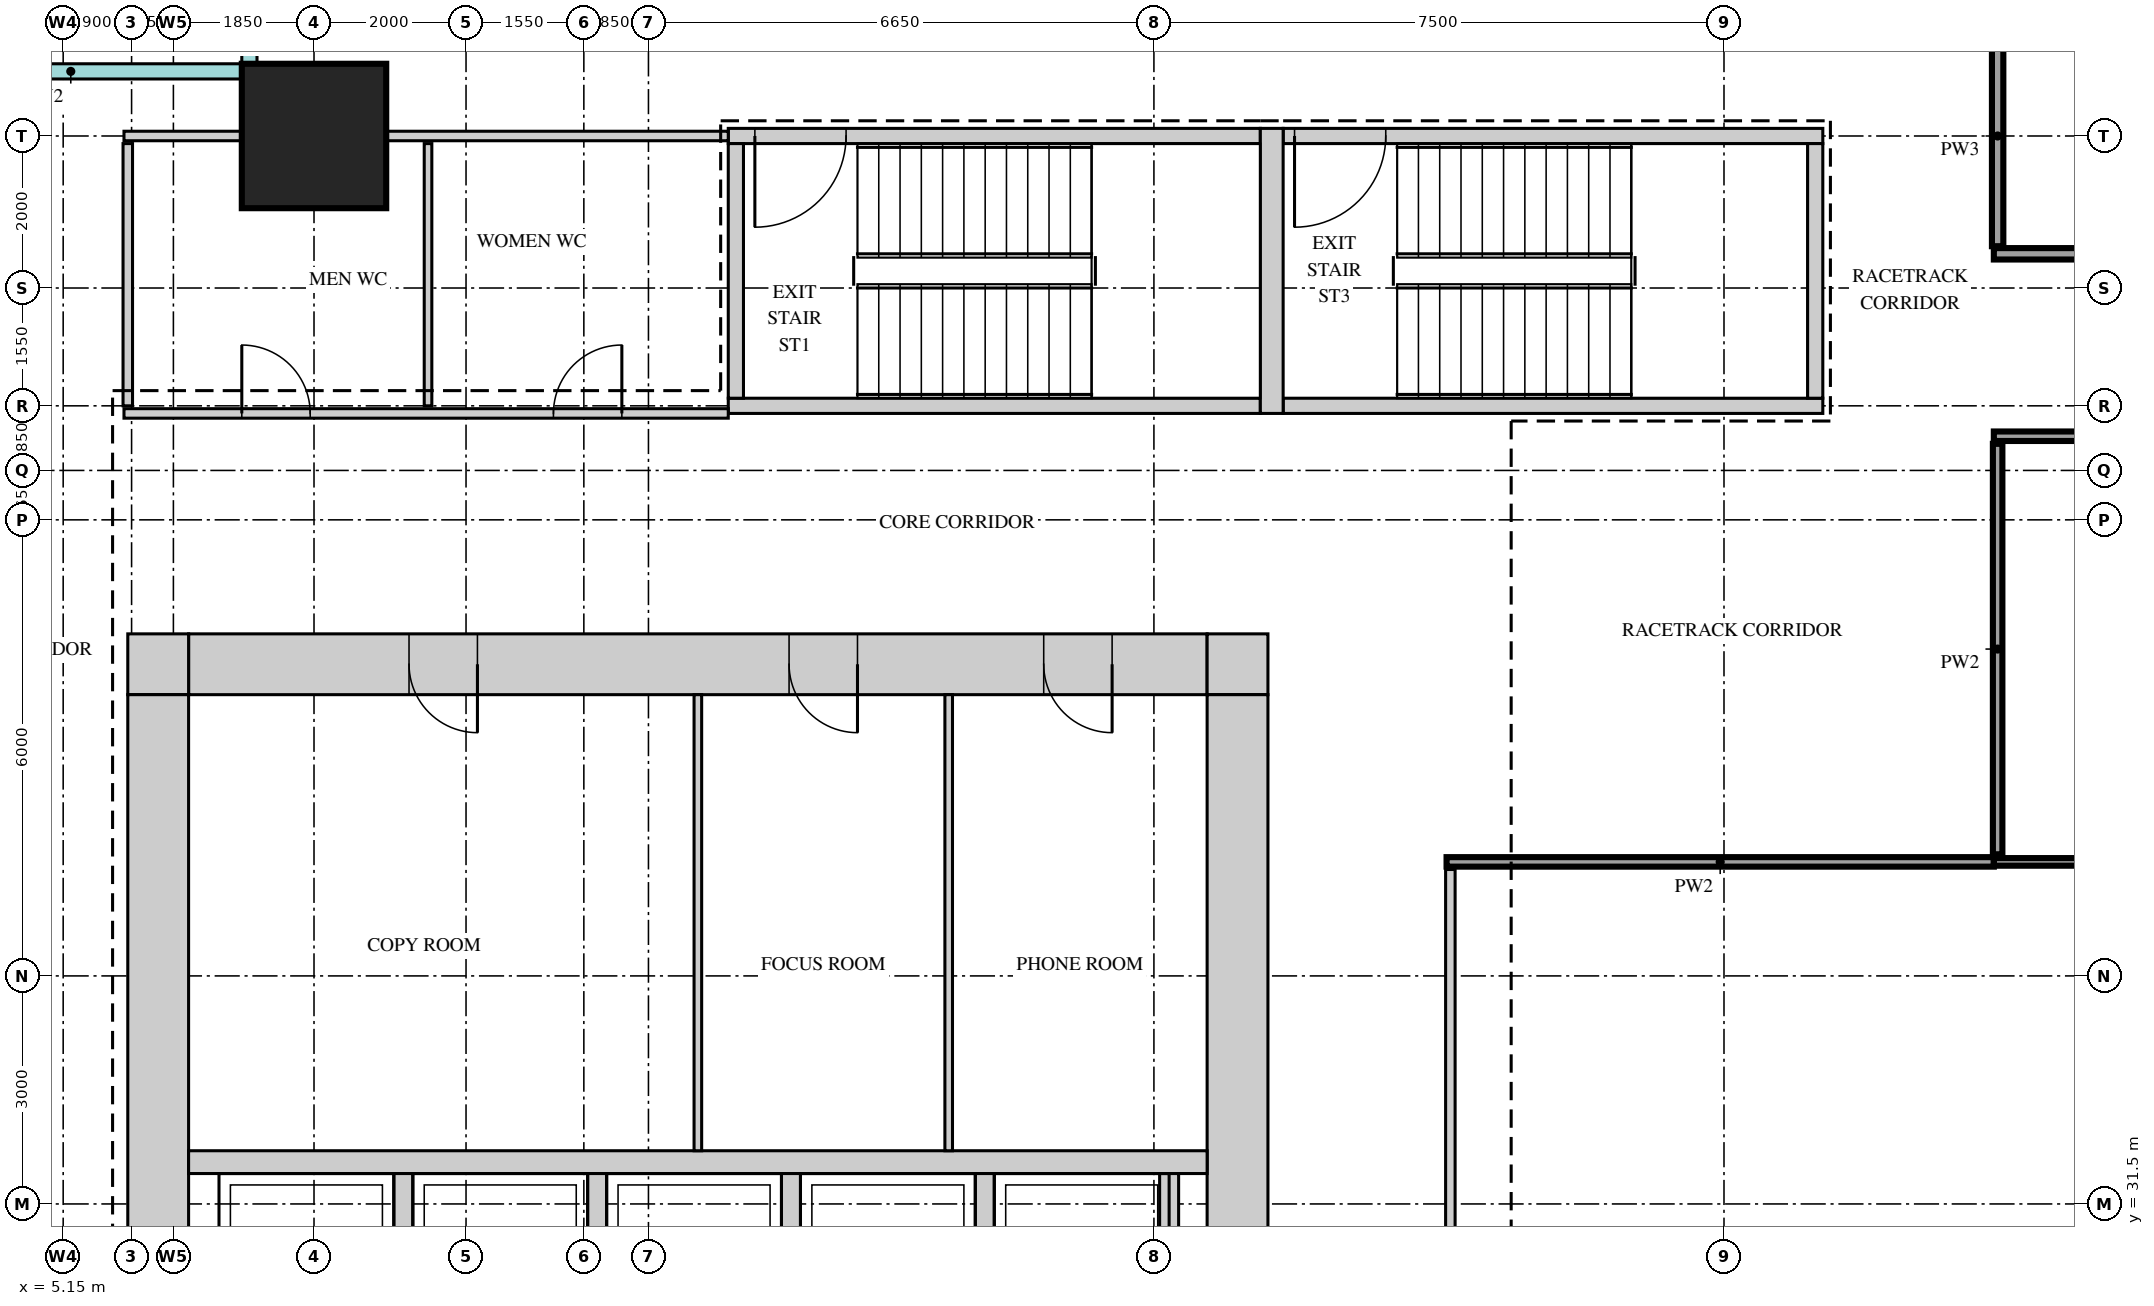
"""IFC4 building model, lengths in metres.
Left out: names, types, materials, properties, quantities, classifications, styles, units other than length and angle.
Written with IfcOpenShell. Run it as: python <this file> out.ifc"""

import sys

from ifc_helpers import new_model, si_unit, direction, frame, frame_2d, origin, origin_2d, place, context, subcontext, project, spatial, rectangle, extrude, source, transform, mapped, element, fill, save


model = new_model("IFC4")
c1 = context("Model", 3, precision=1e-05, world=origin(), true_north=direction((0.0, 1.0)))
c2 = subcontext(c1, "Body", "Model", "MODEL_VIEW")
j1 = project(units=[si_unit("LENGTHUNIT", "METRE"), si_unit("PLANEANGLEUNIT", "RADIAN")], contexts=[c1])
p1 = place(None, origin())
s1 = spatial("IfcSite", under=j1, at=p1, CompositionType="ELEMENT")
p2 = place(p1, origin())
s2 = spatial("IfcBuilding", under=s1, at=p2, CompositionType="ELEMENT")
p3 = place(p2, frame((0.0, 0.0, 212.7)))
s3 = spatial("IfcBuildingStorey", under=s2, at=p3, CompositionType="ELEMENT", Elevation=212.7)
m1 = source(origin(), c2, "Body", "SweptSolid", [
    extrude(rectangle(XDim=13.4, YDim=0.8, at=frame_2d((6.7, 0.0))), origin(), (0.0, 0.0, 1.0), 3.75),
])
p4 = place(p3, frame((6.8, 38.6, 0.0), z_axis=(0.0, 0.0, 1.0), x_axis=(1.0, 0.0, 0.0)))
e1 = element("IfcWall", 1, at=p4, inside=s3, PredefinedType="SHEAR", context=c2, shape_type="MappedRepresentation", body=[
    mapped(m1, transform((0.0, 0.0, 0.0))),
])
m2 = source(origin(), c2, "Body", "SweptSolid", [
    extrude(rectangle(XDim=0.9, YDim=2.1, at=frame_2d((0.45, 1.05))), frame((0.0, 0.41, 0.0), z_axis=(0.0, -1.0, 0.0), x_axis=(1.0, 0.0, 0.0)), (0.0, 0.0, 1.0), 0.82),
])
p5 = place(p4, frame((2.9, 0.0, 0.0)))
e2 = element("IfcOpeningElement", 2, at=p5, cuts=e1, PredefinedType="OPENING", context=c2, shape_type="MappedRepresentation", body=[
    mapped(m2, transform((0.0, 0.0, 0.0))),
])
p6 = place(p4, frame((7.9, 0.0, 0.0)))
e3 = element("IfcOpeningElement", 3, at=p6, cuts=e1, PredefinedType="OPENING", context=c2, shape_type="MappedRepresentation", body=[
    mapped(m2, transform((0.0, 0.0, 0.0))),
])
p7 = place(p4, frame((11.25, 0.0, 0.0)))
e4 = element("IfcOpeningElement", 4, at=p7, cuts=e1, PredefinedType="OPENING", context=c2, shape_type="MappedRepresentation", body=[
    mapped(m2, transform((0.0, 0.0, 0.0))),
])
m3 = source(origin(), c2, "Body", "SweptSolid", [
    extrude(rectangle(XDim=0.8, YDim=0.8, at=frame_2d((0.4, 0.0))), origin(), (0.0, 0.0, 1.0), 3.75),
])
for number, where, z_axis, x_axis in (
    (5, (20.2, 38.6, 0.0), (0.0, 0.0, 1.0), (1.0, 0.0, 0.0)),
    (6, (6.0, 38.6, 0.0), (0.0, 0.0, 1.0), (1.0, 0.0, 0.0)),
):
    element("IfcWall", number, at=place(p3, frame(where, z_axis=z_axis, x_axis=x_axis)), inside=s3, PredefinedType="SHEAR", context=c2, shape_type="MappedRepresentation", body=[
        mapped(m3, transform((0.0, 0.0, 0.0))),
    ])
m4 = source(origin(), c2, "Body", "SweptSolid", [
    extrude(rectangle(XDim=22.4, YDim=0.8, at=frame_2d((11.2, 0.0))), origin(), (0.0, 0.0, 1.0), 3.75),
])
p8 = place(p3, frame((20.6, 15.8, 0.0), z_axis=(0.0, 0.0, 1.0), x_axis=(0.0, 1.0, 0.0)))
e7 = element("IfcWall", 7, at=p8, inside=s3, PredefinedType="SHEAR", context=c2, shape_type="MappedRepresentation", body=[
    mapped(m4, transform((0.0, 0.0, 0.0))),
])
m5 = source(origin(), c2, "Body", "SweptSolid", [
    extrude(rectangle(XDim=1.8, YDim=2.1, at=frame_2d((0.9, 1.05))), frame((0.0, 0.41, 0.0), z_axis=(0.0, -1.0, 0.0), x_axis=(1.0, 0.0, 0.0)), (0.0, 0.0, 1.0), 0.82),
])
p9 = place(p8, frame((10.7, 0.0, 0.0)))
e8 = element("IfcOpeningElement", 8, at=p9, cuts=e7, PredefinedType="OPENING", context=c2, shape_type="MappedRepresentation", body=[
    mapped(m5, transform((0.0, 0.0, 0.0))),
])
p10 = place(p8, frame((0.35, 0.0, 0.0)))
e9 = element("IfcOpeningElement", 9, at=p10, cuts=e7, PredefinedType="OPENING", context=c2, shape_type="MappedRepresentation", body=[
    mapped(m2, transform((0.0, 0.0, 0.0))),
])
p11 = place(p8, frame((3.9, 0.0, 0.0)))
e10 = element("IfcOpeningElement", 10, at=p11, cuts=e7, PredefinedType="OPENING", context=c2, shape_type="MappedRepresentation", body=[
    mapped(m2, transform((0.0, 0.0, 0.0))),
])
p12 = place(p3, frame((6.4, 15.8, 0.0), z_axis=(0.0, 0.0, 1.0), x_axis=(0.0, 1.0, 0.0)))
e11 = element("IfcWall", 11, at=p12, inside=s3, PredefinedType="SHEAR", context=c2, shape_type="MappedRepresentation", body=[
    mapped(m4, transform((0.0, 0.0, 0.0))),
])
m6 = source(origin(), c2, "Body", "SweptSolid", [
    extrude(rectangle(XDim=7.0, YDim=0.2, at=frame_2d((3.5, 0.0))), origin(), (0.0, 0.0, 1.0), 3.75),
])
p13 = place(p3, frame((13.9, 45.55, 0.0), z_axis=(0.0, 0.0, 1.0), x_axis=(1.0, 0.0, 0.0)))
e12 = element("IfcWall", 12, at=p13, inside=s3, PredefinedType="SHEAR", context=c2, shape_type="MappedRepresentation", body=[
    mapped(m6, transform((0.0, 0.0, 0.0))),
])
m7 = source(origin(), c2, "Body", "SweptSolid", [
    extrude(rectangle(XDim=1.2, YDim=2.1, at=frame_2d((0.6, 1.05))), frame((0.0, 0.11, 0.0), z_axis=(0.0, -1.0, 0.0), x_axis=(1.0, 0.0, 0.0)), (0.0, 0.0, 1.0), 0.22),
])
p14 = place(p13, frame((0.35, 0.0, 0.0)))
e13 = element("IfcOpeningElement", 13, at=p14, cuts=e12, PredefinedType="OPENING", context=c2, shape_type="MappedRepresentation", body=[
    mapped(m7, transform((0.0, 0.0, 0.0))),
])
p15 = place(p3, frame((13.9, 42.0, 0.0), z_axis=(0.0, 0.0, 1.0), x_axis=(1.0, 0.0, 0.0)))
e14 = element("IfcWall", 14, at=p15, inside=s3, PredefinedType="SHEAR", context=c2, shape_type="MappedRepresentation", body=[
    mapped(m6, transform((0.0, 0.0, 0.0))),
])
m8 = source(origin(), c2, "Body", "SweptSolid", [
    extrude(rectangle(XDim=7.1, YDim=0.2, at=frame_2d((3.55, 0.0))), origin(), (0.0, 0.0, 1.0), 3.75),
])
p16 = place(p3, frame((21.2, 45.55, 0.0), z_axis=(0.0, 0.0, 1.0), x_axis=(1.0, 0.0, 0.0)))
e15 = element("IfcWall", 15, at=p16, inside=s3, PredefinedType="SHEAR", context=c2, shape_type="MappedRepresentation", body=[
    mapped(m8, transform((0.0, 0.0, 0.0))),
])
p17 = place(p16, frame((0.15, 0.0, 0.0)))
e16 = element("IfcOpeningElement", 16, at=p17, cuts=e15, PredefinedType="OPENING", context=c2, shape_type="MappedRepresentation", body=[
    mapped(m7, transform((0.0, 0.0, 0.0))),
])
p18 = place(p3, frame((21.2, 42.0, 0.0), z_axis=(0.0, 0.0, 1.0), x_axis=(1.0, 0.0, 0.0)))
e17 = element("IfcWall", 17, at=p18, inside=s3, PredefinedType="SHEAR", context=c2, shape_type="MappedRepresentation", body=[
    mapped(m8, transform((0.0, 0.0, 0.0))),
])
m9 = source(origin(), c2, "Body", "SweptSolid", [
    extrude(rectangle(XDim=3.75, YDim=0.3, at=frame_2d((1.875, 0.0))), origin(), (0.0, 0.0, 1.0), 3.75),
])
p19 = place(p3, frame((21.05, 41.9, 0.0), z_axis=(0.0, 0.0, 1.0), x_axis=(0.0, 1.0, 0.0)))
e18 = element("IfcWall", 18, at=p19, inside=s3, PredefinedType="SHEAR", context=c2, shape_type="MappedRepresentation", body=[
    mapped(m9, transform((0.0, 0.0, 0.0))),
])
m10 = source(origin(), c2, "Body", "SweptSolid", [
    extrude(rectangle(XDim=3.35, YDim=0.2, at=frame_2d((1.675, 0.0))), origin(), (0.0, 0.0, 1.0), 3.75),
])
for number, where, z_axis, x_axis in (
    (19, (14.0, 42.1, 0.0), (0.0, 0.0, 1.0), (0.0, 1.0, 0.0)),
    (20, (28.2, 42.1, 0.0), (0.0, 0.0, 1.0), (0.0, 1.0, 0.0)),
):
    element("IfcWall", number, at=place(p3, frame(where, z_axis=z_axis, x_axis=x_axis)), inside=s3, PredefinedType="SHEAR", context=c2, shape_type="MappedRepresentation", body=[
        mapped(m10, transform((0.0, 0.0, 0.0))),
    ])
m11 = source(origin(), c2, "Body", "SweptSolid", [
    extrude(rectangle(XDim=13.4, YDim=0.3, at=frame_2d((6.7, 0.0))), origin(), (0.0, 0.0, 1.0), 3.75),
])
p20 = place(p3, frame((6.8, 32.05, 0.0), z_axis=(0.0, 0.0, 1.0), x_axis=(1.0, 0.0, 0.0)))
e21 = element("IfcWall", 21, at=p20, inside=s3, PredefinedType="STANDARD", context=c2, shape_type="MappedRepresentation", body=[
    mapped(m11, transform((0.0, 0.0, 0.0))),
])
m12 = source(origin(), c2, "Body", "SweptSolid", [
    extrude(rectangle(XDim=2.4, YDim=0.25, at=frame_2d((1.2, 0.0))), origin(), (0.0, 0.0, 1.0), 3.75),
])
for number, where, z_axis, x_axis in (
    (22, (17.275, 29.5, 0.0), (0.0, 0.0, 1.0), (0.0, 1.0, 0.0)),
    (23, (19.7, 29.5, 0.0), (0.0, 0.0, 1.0), (0.0, 1.0, 0.0)),
    (24, (9.625, 29.5, 0.0), (0.0, 0.0, 1.0), (0.0, 1.0, 0.0)),
    (25, (12.175, 29.5, 0.0), (0.0, 0.0, 1.0), (0.0, 1.0, 0.0)),
    (26, (14.725, 29.5, 0.0), (0.0, 0.0, 1.0), (0.0, 1.0, 0.0)),
):
    element("IfcWall", number, at=place(p3, frame(where, z_axis=z_axis, x_axis=x_axis)), inside=s3, PredefinedType="STANDARD", context=c2, shape_type="MappedRepresentation", body=[
        mapped(m12, transform((0.0, 0.0, 0.0))),
    ])
m13 = source(origin(), c2, "Body", "SweptSolid", [
    extrude(rectangle(XDim=1.9, YDim=1.9, at=origin_2d()), origin(), (0.0, 0.0, 1.0), 4.0),
])
p21 = place(p3, frame((8.45, 45.55, 0.0), z_axis=(0.0, 0.0, 1.0), x_axis=(1.0, 0.0, 0.0)))
e27 = element("IfcColumn", 27, at=p21, inside=s3, PredefinedType="COLUMN", context=c2, shape_type="MappedRepresentation", body=[
    mapped(m13, transform((0.0, 0.0, 0.0))),
])
m14 = source(origin(), c2, "Body", "SweptSolid", [
    extrude(rectangle(XDim=23.4, YDim=0.125, at=frame_2d((11.7, 0.0))), origin(), (0.0, 0.0, 1.0), 3.8),
])
p22 = place(p3, frame((23.4, 12.5, 0.0), z_axis=(0.0, 0.0, 1.0), x_axis=(0.0, 1.0, 0.0)))
e28 = element("IfcWall", 28, at=p22, inside=s3, PredefinedType="PARTITIONING", context=c2, shape_type="MappedRepresentation", body=[
    mapped(m14, transform((0.0, 0.0, 0.0))),
])
m15 = source(origin(), c2, "Body", "SweptSolid", [
    extrude(rectangle(XDim=1.2, YDim=2.1, at=frame_2d((0.6, 1.05))), frame((0.0, 0.073, 0.0), z_axis=(0.0, -1.0, 0.0), x_axis=(1.0, 0.0, 0.0)), (0.0, 0.0, 1.0), 0.145),
])
p23 = place(p22, frame((11.1, 0.0, 0.0)))
e29 = element("IfcOpeningElement", 29, at=p23, cuts=e28, PredefinedType="OPENING", context=c2, shape_type="MappedRepresentation", body=[
    mapped(m15, transform((0.0, 0.0, 0.0))),
])
m16 = source(origin(), c2, "Body", "SweptSolid", [
    extrude(rectangle(XDim=6.0, YDim=0.1, at=frame_2d((3.0, 0.0))), origin(), (0.0, 0.0, 1.0), 3.8),
])
for number, where, z_axis, x_axis in (
    (30, (13.5, 32.2, 0.0), (0.0, 0.0, 1.0), (0.0, 1.0, 0.0)),
    (31, (16.8, 32.2, 0.0), (0.0, 0.0, 1.0), (0.0, 1.0, 0.0)),
):
    element("IfcWall", number, at=place(p3, frame(where, z_axis=z_axis, x_axis=x_axis)), inside=s3, PredefinedType="PARTITIONING", context=c2, shape_type="MappedRepresentation", body=[
        mapped(m16, transform((0.0, 0.0, 0.0))),
    ])
m17 = source(origin(), c2, "Body", "SweptSolid", [
    extrude(rectangle(XDim=7.2, YDim=0.125, at=frame_2d((3.6, 0.0))), origin(), (0.0, 0.0, 1.0), 3.8),
])
p24 = place(p3, frame((23.35, 36.0, 0.0), z_axis=(0.0, 0.0, 1.0), x_axis=(1.0, 0.0, 0.0)))
e32 = element("IfcWall", 32, at=p24, inside=s3, PredefinedType="PARTITIONING", context=c2, shape_type="MappedRepresentation", body=[
    mapped(m17, transform((0.0, 0.0, 0.0))),
])
m18 = source(origin(), c2, "Body", "SweptSolid", [
    extrude(rectangle(XDim=10.95, YDim=0.1, at=frame_2d((5.475, 0.0))), origin(), (0.0, 0.0, 1.0), 3.8),
])
p25 = place(p3, frame((30.55, 36.0, 0.0), z_axis=(0.0, 0.0, 1.0), x_axis=(1.0, 0.0, 0.0)))
e33 = element("IfcWall", 33, at=p25, inside=s3, PredefinedType="PARTITIONING", context=c2, shape_type="MappedRepresentation", body=[
    mapped(m18, transform((0.0, 0.0, 0.0))),
])
m19 = source(origin(), c2, "Body", "SweptSolid", [
    extrude(rectangle(XDim=5.4, YDim=0.125, at=frame_2d((2.7, 0.0))), origin(), (0.0, 0.0, 1.0), 3.8),
])
p26 = place(p3, frame((30.6, 36.1, 0.0), z_axis=(0.0, 0.0, 1.0), x_axis=(0.0, 1.0, 0.0)))
e34 = element("IfcWall", 34, at=p26, inside=s3, PredefinedType="PARTITIONING", context=c2, shape_type="MappedRepresentation", body=[
    mapped(m19, transform((0.0, 0.0, 0.0))),
])
m20 = source(origin(), c2, "Body", "SweptSolid", [
    extrude(rectangle(XDim=11.1, YDim=0.125, at=frame_2d((5.55, 0.0))), origin(), (0.0, 0.0, 1.0), 3.8),
])
p27 = place(p3, frame((30.55, 41.6, 0.0), z_axis=(0.0, 0.0, 1.0), x_axis=(1.0, 0.0, 0.0)))
e35 = element("IfcWall", 35, at=p27, inside=s3, PredefinedType="PARTITIONING", context=c2, shape_type="MappedRepresentation", body=[
    mapped(m20, transform((0.0, 0.0, 0.0))),
])
m21 = source(origin(), c2, "Body", "SweptSolid", [
    extrude(rectangle(XDim=7.95, YDim=0.125, at=frame_2d((3.975, 0.0))), origin(), (0.0, 0.0, 1.0), 3.8),
])
p28 = place(p3, frame((5.95, 41.9, 0.0), z_axis=(0.0, 0.0, 1.0), x_axis=(1.0, 0.0, 0.0)))
e36 = element("IfcWall", 36, at=p28, inside=s3, PredefinedType="PARTITIONING", context=c2, shape_type="MappedRepresentation", body=[
    mapped(m21, transform((0.0, 0.0, 0.0))),
])
m22 = source(origin(), c2, "Body", "SweptSolid", [
    extrude(rectangle(XDim=0.9, YDim=2.1, at=frame_2d((0.45, 1.05))), frame((0.0, 0.073, 0.0), z_axis=(0.0, -1.0, 0.0), x_axis=(1.0, 0.0, 0.0)), (0.0, 0.0, 1.0), 0.145),
])
p29 = place(p28, frame((1.55, 0.0, 0.0)))
e37 = element("IfcOpeningElement", 37, at=p29, cuts=e36, PredefinedType="OPENING", context=c2, shape_type="MappedRepresentation", body=[
    mapped(m22, transform((0.0, 0.0, 0.0))),
])
p30 = place(p28, frame((5.65, 0.0, 0.0)))
e38 = element("IfcOpeningElement", 38, at=p30, cuts=e36, PredefinedType="OPENING", context=c2, shape_type="MappedRepresentation", body=[
    mapped(m22, transform((0.0, 0.0, 0.0))),
])
m23 = source(origin(), c2, "Body", "SweptSolid", [
    extrude(rectangle(XDim=3.45, YDim=0.125, at=frame_2d((1.725, 0.0))), origin(), (0.0, 0.0, 1.0), 3.8),
])
p31 = place(p3, frame((6.0, 42.0, 0.0), z_axis=(0.0, 0.0, 1.0), x_axis=(0.0, 1.0, 0.0)))
e39 = element("IfcWall", 39, at=p31, inside=s3, PredefinedType="PARTITIONING", context=c2, shape_type="MappedRepresentation", body=[
    mapped(m23, transform((0.0, 0.0, 0.0))),
])
m24 = source(origin(), c2, "Body", "SweptSolid", [
    extrude(rectangle(XDim=3.45, YDim=0.1, at=frame_2d((1.725, 0.0))), origin(), (0.0, 0.0, 1.0), 3.8),
])
p32 = place(p3, frame((9.95, 42.0, 0.0), z_axis=(0.0, 0.0, 1.0), x_axis=(0.0, 1.0, 0.0)))
e40 = element("IfcWall", 40, at=p32, inside=s3, PredefinedType="PARTITIONING", context=c2, shape_type="MappedRepresentation", body=[
    mapped(m24, transform((0.0, 0.0, 0.0))),
])
m25 = source(origin(), c2, "Body", "SweptSolid", [
    extrude(rectangle(XDim=11.4, YDim=0.15, at=frame_2d((5.7, 0.0))), origin(), (0.0, 0.0, 1.0), 3.8),
])
p33 = place(p3, frame((30.55, 44.0, 0.0), z_axis=(0.0, 0.0, 1.0), x_axis=(1.0, 0.0, 0.0)))
e41 = element("IfcWall", 41, at=p33, inside=s3, PredefinedType="PARTITIONING", context=c2, shape_type="MappedRepresentation", body=[
    mapped(m25, transform((0.0, 0.0, 0.0))),
])
m26 = source(origin(), c2, "Body", "SweptSolid", [
    extrude(rectangle(XDim=0.9, YDim=2.1, at=frame_2d((0.45, 1.05))), frame((0.0, 0.085, 0.0), z_axis=(0.0, -1.0, 0.0), x_axis=(1.0, 0.0, 0.0)), (0.0, 0.0, 1.0), 0.17),
])
p34 = place(p33, frame((5.3, 0.0, 0.0)))
e42 = element("IfcOpeningElement", 42, at=p34, cuts=e41, PredefinedType="OPENING", context=c2, shape_type="MappedRepresentation", body=[
    mapped(m26, transform((0.0, 0.0, 0.0))),
])
m27 = source(origin(), c2, "Body", "SweptSolid", [
    extrude(rectangle(XDim=2.9, YDim=0.15, at=frame_2d((1.45, 0.0))), origin(), (0.0, 0.0, 1.0), 3.8),
])
p35 = place(p3, frame((30.6, 44.1, 0.0), z_axis=(0.0, 0.0, 1.0), x_axis=(0.0, 1.0, 0.0)))
e43 = element("IfcWall", 43, at=p35, inside=s3, PredefinedType="PARTITIONING", context=c2, shape_type="MappedRepresentation", body=[
    mapped(m27, transform((0.0, 0.0, 0.0))),
])
m28 = source(origin(), c2, "Body", "SweptSolid", [
    extrude(rectangle(XDim=7.95, YDim=0.125, at=frame_2d((3.975, 0.0))), origin(), (0.0, 0.0, 1.0), 3.1),
])
p36 = place(p3, frame((5.95, 45.55, 0.0), z_axis=(0.0, 0.0, 1.0), x_axis=(1.0, 0.0, 0.0)))
e44 = element("IfcWall", 44, at=p36, inside=s3, PredefinedType="PARTITIONING", context=c2, shape_type="MappedRepresentation", body=[
    mapped(m28, transform((0.0, 0.0, 0.0))),
])
m29 = source(origin(), c2, "Body", "SweptSolid", [
    extrude(rectangle(XDim=0.9, YDim=2.1, at=frame_2d((0.45, 1.05))), frame((0.0, 0.35, 0.0), z_axis=(0.0, -1.0, 0.0), x_axis=(1.0, 0.0, 0.0)), (0.0, 0.0, 1.0), 0.7),
])
p37 = place(p5, origin())
e45 = element("IfcDoor", 45, at=p37, inside=s3, OperationType="SINGLE_SWING_RIGHT", PredefinedType="DOOR", context=c2, shape_type="MappedRepresentation", body=[
    mapped(m29, transform((0.0, 0.0, 0.0))),
])
fill(e2, e45)
p38 = place(p6, origin())
e46 = element("IfcDoor", 46, at=p38, inside=s3, OperationType="SINGLE_SWING_RIGHT", PredefinedType="DOOR", context=c2, shape_type="MappedRepresentation", body=[
    mapped(m29, transform((0.0, 0.0, 0.0))),
])
fill(e3, e46)
p39 = place(p7, origin())
e47 = element("IfcDoor", 47, at=p39, inside=s3, OperationType="SINGLE_SWING_RIGHT", PredefinedType="DOOR", context=c2, shape_type="MappedRepresentation", body=[
    mapped(m29, transform((0.0, 0.0, 0.0))),
])
fill(e4, e47)
m30 = source(origin(), c2, "Body", "SweptSolid", [
    extrude(rectangle(XDim=0.9, YDim=2.1, at=frame_2d((0.45, 1.05))), frame((0.0, 0.025, 0.0), z_axis=(0.0, -1.0, 0.0), x_axis=(1.0, 0.0, 0.0)), (0.0, 0.0, 1.0), 0.05),
])
p40 = place(p29, origin())
e48 = element("IfcDoor", 48, at=p40, inside=s3, OperationType="SINGLE_SWING_RIGHT", PredefinedType="DOOR", context=c2, shape_type="MappedRepresentation", body=[
    mapped(m30, transform((0.0, 0.0, 0.0))),
])
fill(e37, e48)
p41 = place(p30, origin())
e49 = element("IfcDoor", 49, at=p41, inside=s3, OperationType="SINGLE_SWING_LEFT", PredefinedType="DOOR", context=c2, shape_type="MappedRepresentation", body=[
    mapped(m30, transform((0.0, 0.0, 0.0))),
])
fill(e38, e49)
m31 = source(origin(), c2, "Body", "SweptSolid", [
    extrude(rectangle(XDim=1.2, YDim=2.1, at=frame_2d((0.6, 1.05))), frame((0.0, 0.025, 0.0), z_axis=(0.0, -1.0, 0.0), x_axis=(1.0, 0.0, 0.0)), (0.0, 0.0, 1.0), 0.05),
])
p42 = place(p14, origin())
e50 = element("IfcDoor", 50, at=p42, inside=s3, OperationType="SINGLE_SWING_LEFT", PredefinedType="DOOR", context=c2, shape_type="MappedRepresentation", body=[
    mapped(m31, transform((0.0, 0.0, 0.0))),
])
fill(e13, e50)
p43 = place(p17, origin())
e51 = element("IfcDoor", 51, at=p43, inside=s3, OperationType="SINGLE_SWING_LEFT", PredefinedType="DOOR", context=c2, shape_type="MappedRepresentation", body=[
    mapped(m31, transform((0.0, 0.0, 0.0))),
])
fill(e16, e51)
save(model, sys.argv[1])
